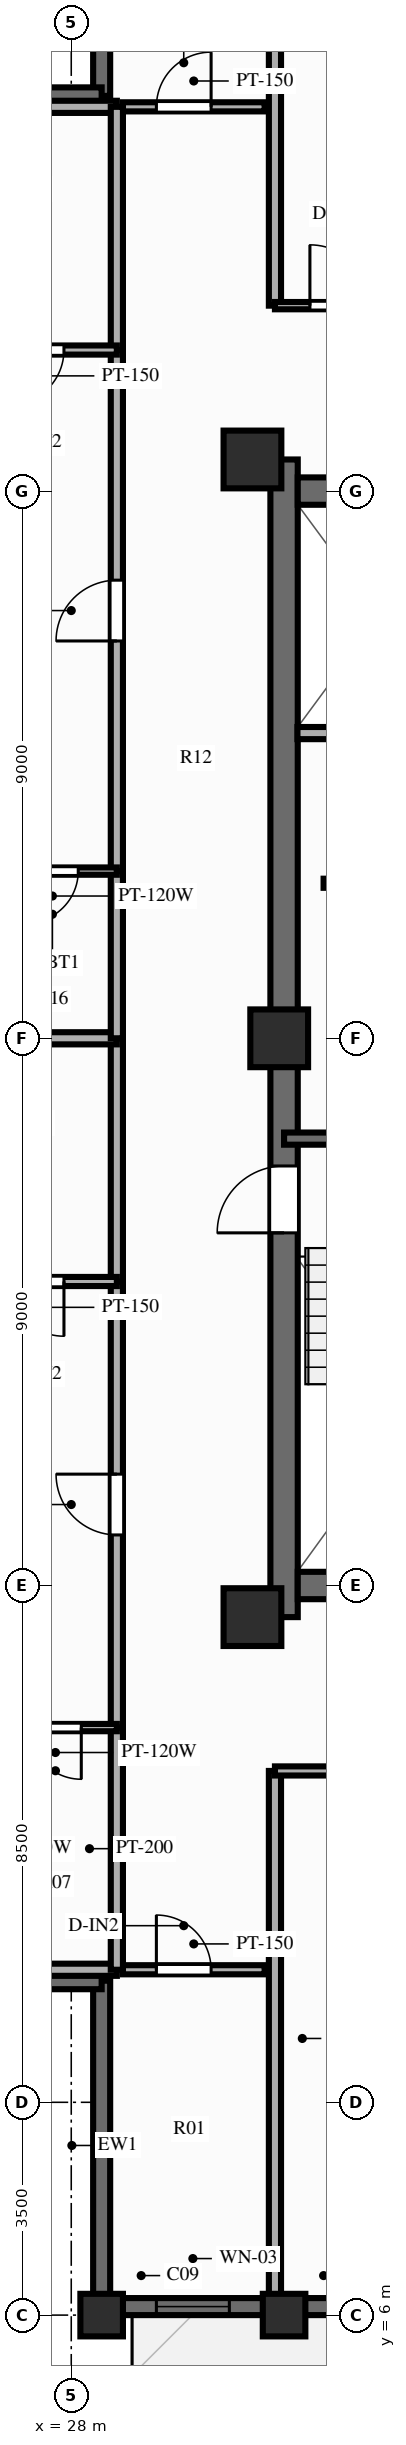
"""IFC4 building model, lengths in metres.
Left out: names, types, materials, properties, quantities, classifications, styles, units other than length and angle.
Written with IfcOpenShell. Run it as: python <this file> out.ifc"""

import sys

from ifc_helpers import new_model, si_unit, direction, frame, frame_2d, origin, origin_2d, place, context, subcontext, project, spatial, rectangle, extrude, source, transform, mapped, element, fill, save


model = new_model("IFC4")
c1 = context("Model", 3, precision=1e-05, world=origin(), true_north=direction((0.0, 1.0)))
c2 = subcontext(c1, "Body", "Model", "MODEL_VIEW")
j1 = project(units=[si_unit("LENGTHUNIT", "METRE"), si_unit("PLANEANGLEUNIT", "RADIAN")], contexts=[c1])
p1 = place(None, origin())
s1 = spatial("IfcSite", under=j1, at=p1, CompositionType="ELEMENT")
p2 = place(p1, origin())
s2 = spatial("IfcBuilding", under=s1, at=p2, CompositionType="ELEMENT")
p3 = place(p2, frame((0.0, 0.0, 243.0)))
s3 = spatial("IfcBuildingStorey", under=s2, at=p3, CompositionType="ELEMENT", Elevation=243.0)
p4 = place(p3, frame((31.5, 17.48, 0.0), z_axis=(0.0, 0.0, 1.0), x_axis=(0.0, 1.0, 0.0)))
e1 = element("IfcWall", 1, at=p4, inside=s3, PredefinedType="SHEAR", context=c2, shape_type="SweptSolid", body=[
    extrude(rectangle(XDim=19.04, YDim=0.45, at=frame_2d((9.52, 0.0))), origin(), (0.0, 0.0, 1.0), 3.0),
])
p5 = place(p4, frame((6.32, 0.0, 0.0)))
e2 = element("IfcOpeningElement", 2, at=p5, cuts=e1, PredefinedType="OPENING", context=c2, shape_type="SweptSolid", body=[
    extrude(rectangle(XDim=1.1, YDim=2.15, at=frame_2d((0.55, 1.075))), frame((0.0, 0.237, 0.0), z_axis=(0.0, -1.0, 0.0), x_axis=(1.0, 0.0, 0.0)), (0.0, 0.0, 1.0), 0.474),
])
p6 = place(p3, frame((31.725, 18.0, 0.0), z_axis=(0.0, 0.0, 1.0), x_axis=(1.0, 0.0, 0.0)))
e3 = element("IfcWall", 3, at=p6, inside=s3, PredefinedType="SHEAR", context=c2, shape_type="SweptSolid", body=[
    extrude(rectangle(XDim=12.55, YDim=0.45, at=frame_2d((6.275, 0.0))), origin(), (0.0, 0.0, 1.0), 3.0),
])
p7 = place(p3, frame((31.725, 36.0, 0.0), z_axis=(0.0, 0.0, 1.0), x_axis=(1.0, 0.0, 0.0)))
e4 = element("IfcWall", 4, at=p7, inside=s3, PredefinedType="SHEAR", context=c2, shape_type="SweptSolid", body=[
    extrude(rectangle(XDim=12.55, YDim=0.45, at=frame_2d((6.275, 0.0))), origin(), (0.0, 0.0, 1.0), 3.0),
])
p8 = place(p7, frame((5.225, 0.0, 0.0), z_axis=(0.0, 0.0, 1.0), x_axis=(-1.0, 0.0, 0.0)))
e5 = element("IfcOpeningElement", 5, at=p8, cuts=e4, PredefinedType="OPENING", context=c2, shape_type="SweptSolid", body=[
    extrude(rectangle(XDim=1.4, YDim=2.15, at=frame_2d((0.7, 1.075))), frame((0.0, 0.237, 0.0), z_axis=(0.0, -1.0, 0.0), x_axis=(1.0, 0.0, 0.0)), (0.0, 0.0, 1.0), 0.474),
])
m1 = source(origin(), c2, "Body", "SweptSolid", [
    extrude(rectangle(XDim=0.95, YDim=0.95, at=origin_2d()), origin(), (0.0, 0.0, 1.0), 3.0),
])
for number, where, z_axis, x_axis in (
    (6, (30.98, 17.48, 0.0), (0.0, 0.0, 1.0), (1.0, 0.0, 0.0)),
    (7, (30.98, 36.52, 0.0), (0.0, 0.0, 1.0), (1.0, 0.0, 0.0)),
    (8, (31.42, 27.0, 0.0), (0.0, 0.0, 1.0), (1.0, 0.0, 0.0)),
):
    element("IfcColumn", number, at=place(p3, frame(where, z_axis=z_axis, x_axis=x_axis)), inside=s3, PredefinedType="COLUMN", context=c2, shape_type="MappedRepresentation", body=[
        mapped(m1, transform((0.0, 0.0, 0.0), scale=1.0)),
    ])
m2 = source(origin(), c2, "Body", "SweptSolid", [
    extrude(rectangle(XDim=0.7, YDim=0.7, at=origin_2d()), origin(), (0.0, 0.0, 1.0), 3.0),
])
for number, where, z_axis, x_axis in (
    (9, (28.5, 6.0, 0.0), (0.0, 0.0, 1.0), (1.0, 0.0, 0.0)),
    (10, (31.5, 6.0, 0.0), (0.0, 0.0, 1.0), (1.0, 0.0, 0.0)),
):
    element("IfcColumn", number, at=place(p3, frame(where, z_axis=z_axis, x_axis=x_axis)), inside=s3, PredefinedType="COLUMN", context=c2, shape_type="MappedRepresentation", body=[
        mapped(m2, transform((0.0, 0.0, 0.0), scale=1.0)),
    ])
p9 = place(p3, frame((28.5, 6.14, 0.0), z_axis=(0.0, 0.0, 1.0), x_axis=(1.0, 0.0, 0.0)))
e11 = element("IfcWall", 11, at=p9, inside=s3, PredefinedType="SOLIDWALL", context=c2, shape_type="SweptSolid", body=[
    extrude(rectangle(XDim=19.0, YDim=0.28, at=frame_2d((9.5, 0.0))), origin(), (0.0, 0.0, 1.0), 2.28),
])
p10 = place(p9, frame((0.9, 0.0, 0.25)))
e12 = element("IfcOpeningElement", 12, at=p10, cuts=e11, PredefinedType="OPENING", context=c2, shape_type="SweptSolid", body=[
    extrude(rectangle(XDim=1.2, YDim=1.5, at=frame_2d((0.6, 0.75))), frame((0.0, 0.152, 0.0), z_axis=(0.0, -1.0, 0.0), x_axis=(1.0, 0.0, 0.0)), (0.0, 0.0, 1.0), 0.304),
])
p11 = place(p9, frame((6.895, 0.0, 0.0), z_axis=(0.0, 0.0, 1.0), x_axis=(-1.0, 0.0, 0.0)))
e13 = element("IfcOpeningElement", 13, at=p11, cuts=e11, PredefinedType="OPENING", context=c2, shape_type="SweptSolid", body=[
    extrude(rectangle(XDim=1.1, YDim=2.15, at=frame_2d((0.55, 1.075))), frame((0.0, 0.152, 0.0), z_axis=(0.0, -1.0, 0.0), x_axis=(1.0, 0.0, 0.0)), (0.0, 0.0, 1.0), 0.304),
])
p12 = place(p9, frame((10.8, 0.0, 0.25)))
e14 = element("IfcOpeningElement", 14, at=p12, cuts=e11, PredefinedType="OPENING", context=c2, shape_type="SweptSolid", body=[
    extrude(rectangle(XDim=1.2, YDim=1.5, at=frame_2d((0.6, 0.75))), frame((0.0, 0.152, 0.0), z_axis=(0.0, -1.0, 0.0), x_axis=(1.0, 0.0, 0.0)), (0.0, 0.0, 1.0), 0.304),
])
p13 = place(p9, frame((13.955, 0.0, 0.25)))
e15 = element("IfcOpeningElement", 15, at=p13, cuts=e11, PredefinedType="OPENING", context=c2, shape_type="SweptSolid", body=[
    extrude(rectangle(XDim=1.2, YDim=1.5, at=frame_2d((0.6, 0.75))), frame((0.0, 0.152, 0.0), z_axis=(0.0, -1.0, 0.0), x_axis=(1.0, 0.0, 0.0)), (0.0, 0.0, 1.0), 0.304),
])
p14 = place(p9, frame((16.9, 0.0, 0.25)))
e16 = element("IfcOpeningElement", 16, at=p14, cuts=e11, PredefinedType="OPENING", context=c2, shape_type="SweptSolid", body=[
    extrude(rectangle(XDim=1.2, YDim=1.5, at=frame_2d((0.6, 0.75))), frame((0.0, 0.152, 0.0), z_axis=(0.0, -1.0, 0.0), x_axis=(1.0, 0.0, 0.0)), (0.0, 0.0, 1.0), 0.304),
])
for number, where, z_axis, x_axis in (
    (17, (28.5, 6.08, 0.0), (0.0, 0.0, 1.0), (0.0, 1.0, 0.0)),
    (18, (23.08, 11.5, 0.0), (0.0, 0.0, 1.0), (1.0, 0.0, 0.0)),
    (19, (28.5, 42.5, 0.0), (0.0, 0.0, 1.0), (0.0, 1.0, 0.0)),
    (20, (23.08, 42.5, 0.0), (0.0, 0.0, 1.0), (1.0, 0.0, 0.0)),
):
    element("IfcWall", number, at=place(p3, frame(where, z_axis=z_axis, x_axis=x_axis)), inside=s3, PredefinedType="SOLIDWALL", context=c2, shape_type="SweptSolid", body=[
        extrude(rectangle(XDim=5.42, YDim=0.28, at=frame_2d((2.71, 0.0))), origin(), (0.0, 0.0, 1.0), 2.28),
    ])
p15 = place(p3, frame((32.15, 29.55, 0.0), z_axis=(0.0, 0.0, 1.0), x_axis=(1.0, 0.0, 0.0)))
e21 = element("IfcWall", 21, at=p15, inside=s3, PredefinedType="PARTITIONING", context=c2, shape_type="SweptSolid", body=[
    extrude(rectangle(XDim=2.27, YDim=0.15, at=frame_2d((1.135, 0.0))), origin(), (0.0, 0.0, 1.0), 2.79),
])
p16 = place(p3, frame((31.5, 25.35, 0.0), z_axis=(0.0, 0.0, 1.0), x_axis=(1.0, 0.0, 0.0)))
e22 = element("IfcWall", 22, at=p16, inside=s3, PredefinedType="SOLIDWALL", context=c2, shape_type="SweptSolid", body=[
    extrude(rectangle(XDim=3.93, YDim=0.2, at=frame_2d((1.965, 0.0))), origin(), (0.0, 0.0, 1.0), 2.79),
])
p17 = place(p3, frame((31.72, 32.02, 0.0), z_axis=(0.0, 0.0, 1.0), x_axis=(1.0, 0.0, 0.0)))
e23 = element("IfcWall", 23, at=p17, inside=s3, PredefinedType="PARTITIONING", context=c2, shape_type="SweptSolid", body=[
    extrude(rectangle(XDim=2.8, YDim=0.2, at=frame_2d((1.4, 0.0))), origin(), (0.0, 0.0, 1.0), 2.79),
])
p18 = place(p3, frame((28.85, 11.68, 0.0), z_axis=(0.0, 0.0, 1.0), x_axis=(1.0, 0.0, 0.0)))
e24 = element("IfcWall", 24, at=p18, inside=s3, PredefinedType="PARTITIONING", context=c2, shape_type="SweptSolid", body=[
    extrude(rectangle(XDim=2.33, YDim=0.15, at=frame_2d((1.165, 0.0))), origin(), (0.0, 0.0, 1.0), 2.79),
])
p19 = place(p18, frame((0.55, 0.0, 0.0)))
e25 = element("IfcOpeningElement", 25, at=p19, cuts=e24, PredefinedType="OPENING", context=c2, shape_type="SweptSolid", body=[
    extrude(rectangle(XDim=0.9, YDim=2.1, at=frame_2d((0.45, 1.05))), frame((0.0, 0.087, 0.0), z_axis=(0.0, -1.0, 0.0), x_axis=(1.0, 0.0, 0.0)), (0.0, 0.0, 1.0), 0.174),
])
p20 = place(p3, frame((28.85, 42.32, 0.0), z_axis=(0.0, 0.0, 1.0), x_axis=(1.0, 0.0, 0.0)))
e26 = element("IfcWall", 26, at=p20, inside=s3, PredefinedType="PARTITIONING", context=c2, shape_type="SweptSolid", body=[
    extrude(rectangle(XDim=2.33, YDim=0.15, at=frame_2d((1.165, 0.0))), origin(), (0.0, 0.0, 1.0), 2.79),
])
p21 = place(p20, frame((0.55, 0.0, 0.0)))
e27 = element("IfcOpeningElement", 27, at=p21, cuts=e26, PredefinedType="OPENING", context=c2, shape_type="SweptSolid", body=[
    extrude(rectangle(XDim=0.9, YDim=2.1, at=frame_2d((0.45, 1.05))), frame((0.0, 0.087, 0.0), z_axis=(0.0, -1.0, 0.0), x_axis=(1.0, 0.0, 0.0)), (0.0, 0.0, 1.0), 0.174),
])
p22 = place(p3, frame((31.35, 14.95, 0.0), z_axis=(0.0, 0.0, 1.0), x_axis=(0.0, -1.0, 0.0)))
e28 = element("IfcWall", 28, at=p22, inside=s3, PredefinedType="PARTITIONING", context=c2, shape_type="SweptSolid", body=[
    extrude(rectangle(XDim=8.8, YDim=0.2, at=frame_2d((4.4, 0.0))), origin(), (0.0, 0.0, 1.0), 2.39),
])
p23 = place(p3, frame((31.35, 14.95, 0.0), z_axis=(0.0, 0.0, 1.0), x_axis=(1.0, 0.0, 0.0)))
e29 = element("IfcWall", 29, at=p23, inside=s3, PredefinedType="PARTITIONING", context=c2, shape_type="SweptSolid", body=[
    extrude(rectangle(XDim=6.65, YDim=0.15, at=frame_2d((3.325, 0.0))), origin(), (0.0, 0.0, 1.0), 2.79),
])
p24 = place(p23, frame((2.775, 0.0, 0.0)))
e30 = element("IfcOpeningElement", 30, at=p24, cuts=e29, PredefinedType="OPENING", context=c2, shape_type="SweptSolid", body=[
    extrude(rectangle(XDim=1.1, YDim=2.15, at=frame_2d((0.55, 1.075))), frame((0.0, 0.087, 0.0), z_axis=(0.0, -1.0, 0.0), x_axis=(1.0, 0.0, 0.0)), (0.0, 0.0, 1.0), 0.174),
])
p25 = place(p3, frame((31.35, 39.05, 0.0), z_axis=(0.0, 0.0, 1.0), x_axis=(0.0, 1.0, 0.0)))
e31 = element("IfcWall", 31, at=p25, inside=s3, PredefinedType="PARTITIONING", context=c2, shape_type="SweptSolid", body=[
    extrude(rectangle(XDim=8.8, YDim=0.2, at=frame_2d((4.4, 0.0))), origin(), (0.0, 0.0, 1.0), 2.39),
])
p26 = place(p3, frame((31.35, 39.05, 0.0), z_axis=(0.0, 0.0, 1.0), x_axis=(1.0, 0.0, 0.0)))
e32 = element("IfcWall", 32, at=p26, inside=s3, PredefinedType="PARTITIONING", context=c2, shape_type="SweptSolid", body=[
    extrude(rectangle(XDim=2.15, YDim=0.12, at=frame_2d((1.075, 0.0))), origin(), (0.0, 0.0, 1.0), 2.79),
])
p27 = place(p26, frame((0.575, 0.0, 0.0)))
e33 = element("IfcOpeningElement", 33, at=p27, cuts=e32, PredefinedType="OPENING", context=c2, shape_type="SweptSolid", body=[
    extrude(rectangle(XDim=1.0, YDim=2.1, at=frame_2d((0.5, 1.05))), frame((0.0, 0.072, 0.0), z_axis=(0.0, -1.0, 0.0), x_axis=(1.0, 0.0, 0.0)), (0.0, 0.0, 1.0), 0.144),
])
for number, where, z_axis, x_axis in (
    (34, (28.75, 11.68, 0.0), (0.0, 0.0, 1.0), (-1.0, 0.0, 0.0)),
    (35, (28.75, 42.32, 0.0), (0.0, 0.0, 1.0), (-1.0, 0.0, 0.0)),
):
    element("IfcWall", number, at=place(p3, frame(where, z_axis=z_axis, x_axis=x_axis)), inside=s3, PredefinedType="PARTITIONING", context=c2, shape_type="SweptSolid", body=[
        extrude(rectangle(XDim=5.6, YDim=0.2, at=frame_2d((2.8, 0.0))), origin(), (0.0, 0.0, 1.0), 2.79),
    ])
p28 = place(p3, frame((28.75, 11.68, 0.0), z_axis=(0.0, 0.0, 1.0), x_axis=(0.0, 1.0, 0.0)))
e36 = element("IfcWall", 36, at=p28, inside=s3, PredefinedType="PARTITIONING", context=c2, shape_type="SweptSolid", body=[
    extrude(rectangle(XDim=3.983, YDim=0.2, at=frame_2d((1.992, 0.0))), origin(), (0.0, 0.0, 1.0), 2.79),
])
p29 = place(p3, frame((28.75, 15.663, 0.0), z_axis=(0.0, 0.0, 1.0), x_axis=(0.0, 1.0, 0.0)))
e37 = element("IfcWall", 37, at=p29, inside=s3, PredefinedType="PARTITIONING", context=c2, shape_type="SweptSolid", body=[
    extrude(rectangle(XDim=7.337, YDim=0.2, at=frame_2d((3.668, 0.0))), origin(), (0.0, 0.0, 1.0), 2.79),
])
p30 = place(p29, frame((3.168, 0.0, 0.0)))
e38 = element("IfcOpeningElement", 38, at=p30, cuts=e37, PredefinedType="OPENING", context=c2, shape_type="SweptSolid", body=[
    extrude(rectangle(XDim=1.0, YDim=2.15, at=frame_2d((0.5, 1.075))), frame((0.0, 0.112, 0.0), z_axis=(0.0, -1.0, 0.0), x_axis=(1.0, 0.0, 0.0)), (0.0, 0.0, 1.0), 0.224),
])
p31 = place(p3, frame((28.75, 23.0, 0.0), z_axis=(0.0, 0.0, 1.0), x_axis=(0.0, 1.0, 0.0)))
e39 = element("IfcWall", 39, at=p31, inside=s3, PredefinedType="PARTITIONING", context=c2, shape_type="SweptSolid", body=[
    extrude(rectangle(XDim=4.0, YDim=0.2, at=frame_2d((2.0, 0.0))), origin(), (0.0, 0.0, 1.0), 2.79),
])
p32 = place(p3, frame((28.75, 15.663, 0.0), z_axis=(0.0, 0.0, 1.0), x_axis=(-1.0, 0.0, 0.0)))
e40 = element("IfcWall", 40, at=p32, inside=s3, PredefinedType="PARTITIONING", context=c2, shape_type="SweptSolid", body=[
    extrude(rectangle(XDim=2.02, YDim=0.12, at=frame_2d((1.01, 0.0))), origin(), (0.0, 0.0, 1.0), 2.79),
])
p33 = place(p32, frame((0.585, 0.0, 0.0)))
e41 = element("IfcOpeningElement", 41, at=p33, cuts=e40, PredefinedType="OPENING", context=c2, shape_type="SweptSolid", body=[
    extrude(rectangle(XDim=0.85, YDim=2.05, at=frame_2d((0.425, 1.025))), frame((0.0, 0.072, 0.0), z_axis=(0.0, -1.0, 0.0), x_axis=(1.0, 0.0, 0.0)), (0.0, 0.0, 1.0), 0.144),
])
p34 = place(p3, frame((28.75, 23.0, 0.0), z_axis=(0.0, 0.0, 1.0), x_axis=(-1.0, 0.0, 0.0)))
e42 = element("IfcWall", 42, at=p34, inside=s3, PredefinedType="PARTITIONING", context=c2, shape_type="SweptSolid", body=[
    extrude(rectangle(XDim=2.64, YDim=0.15, at=frame_2d((1.32, 0.0))), origin(), (0.0, 0.0, 1.0), 2.79),
])
p35 = place(p34, frame((0.87, 0.0, 0.0)))
e43 = element("IfcOpeningElement", 43, at=p35, cuts=e42, PredefinedType="OPENING", context=c2, shape_type="SweptSolid", body=[
    extrude(rectangle(XDim=0.9, YDim=2.1, at=frame_2d((0.45, 1.05))), frame((0.0, 0.087, 0.0), z_axis=(0.0, -1.0, 0.0), x_axis=(1.0, 0.0, 0.0)), (0.0, 0.0, 1.0), 0.174),
])
p36 = place(p3, frame((28.75, 27.0, 0.0), z_axis=(0.0, 0.0, 1.0), x_axis=(-1.0, 0.0, 0.0)))
e44 = element("IfcWall", 44, at=p36, inside=s3, PredefinedType="PARTITIONING", context=c2, shape_type="SweptSolid", body=[
    extrude(rectangle(XDim=5.6, YDim=0.2, at=frame_2d((2.8, 0.0))), origin(), (0.0, 0.0, 1.0), 2.79),
])
p37 = place(p3, frame((28.75, 27.0, 0.0), z_axis=(0.0, 0.0, 1.0), x_axis=(0.0, 1.0, 0.0)))
e45 = element("IfcWall", 45, at=p37, inside=s3, PredefinedType="PARTITIONING", context=c2, shape_type="SweptSolid", body=[
    extrude(rectangle(XDim=2.75, YDim=0.2, at=frame_2d((1.375, 0.0))), origin(), (0.0, 0.0, 1.0), 2.79),
])
p38 = place(p3, frame((28.75, 29.75, 0.0), z_axis=(0.0, 0.0, 1.0), x_axis=(0.0, 1.0, 0.0)))
e46 = element("IfcWall", 46, at=p38, inside=s3, PredefinedType="PARTITIONING", context=c2, shape_type="SweptSolid", body=[
    extrude(rectangle(XDim=8.57, YDim=0.2, at=frame_2d((4.285, 0.0))), origin(), (0.0, 0.0, 1.0), 2.79),
])
p39 = place(p38, frame((3.785, 0.0, 0.0)))
e47 = element("IfcOpeningElement", 47, at=p39, cuts=e46, PredefinedType="OPENING", context=c2, shape_type="SweptSolid", body=[
    extrude(rectangle(XDim=1.0, YDim=2.15, at=frame_2d((0.5, 1.075))), frame((0.0, 0.112, 0.0), z_axis=(0.0, -1.0, 0.0), x_axis=(1.0, 0.0, 0.0)), (0.0, 0.0, 1.0), 0.224),
])
p40 = place(p3, frame((28.75, 38.32, 0.0), z_axis=(0.0, 0.0, 1.0), x_axis=(0.0, 1.0, 0.0)))
e48 = element("IfcWall", 48, at=p40, inside=s3, PredefinedType="PARTITIONING", context=c2, shape_type="SweptSolid", body=[
    extrude(rectangle(XDim=4.0, YDim=0.2, at=frame_2d((2.0, 0.0))), origin(), (0.0, 0.0, 1.0), 2.79),
])
p41 = place(p3, frame((28.75, 29.75, 0.0), z_axis=(0.0, 0.0, 1.0), x_axis=(-1.0, 0.0, 0.0)))
e49 = element("IfcWall", 49, at=p41, inside=s3, PredefinedType="PARTITIONING", context=c2, shape_type="SweptSolid", body=[
    extrude(rectangle(XDim=2.12, YDim=0.12, at=frame_2d((1.06, 0.0))), origin(), (0.0, 0.0, 1.0), 2.79),
])
p42 = place(p41, frame((0.635, 0.0, 0.0)))
e50 = element("IfcOpeningElement", 50, at=p42, cuts=e49, PredefinedType="OPENING", context=c2, shape_type="SweptSolid", body=[
    extrude(rectangle(XDim=0.85, YDim=2.05, at=frame_2d((0.425, 1.025))), frame((0.0, 0.072, 0.0), z_axis=(0.0, -1.0, 0.0), x_axis=(1.0, 0.0, 0.0)), (0.0, 0.0, 1.0), 0.144),
])
p43 = place(p3, frame((28.75, 38.32, 0.0), z_axis=(0.0, 0.0, 1.0), x_axis=(-1.0, 0.0, 0.0)))
e51 = element("IfcWall", 51, at=p43, inside=s3, PredefinedType="PARTITIONING", context=c2, shape_type="SweptSolid", body=[
    extrude(rectangle(XDim=2.64, YDim=0.15, at=frame_2d((1.32, 0.0))), origin(), (0.0, 0.0, 1.0), 2.79),
])
p44 = place(p43, frame((0.87, 0.0, 0.0)))
e52 = element("IfcOpeningElement", 52, at=p44, cuts=e51, PredefinedType="OPENING", context=c2, shape_type="SweptSolid", body=[
    extrude(rectangle(XDim=0.9, YDim=2.1, at=frame_2d((0.45, 1.05))), frame((0.0, 0.087, 0.0), z_axis=(0.0, -1.0, 0.0), x_axis=(1.0, 0.0, 0.0)), (0.0, 0.0, 1.0), 0.174),
])
m3 = source(origin(), c2, "Body", "SweptSolid", [
    extrude(rectangle(XDim=1.2, YDim=1.5, at=frame_2d((0.6, 0.75))), frame((0.0, 0.03, 0.0), z_axis=(0.0, -1.0, 0.0), x_axis=(1.0, 0.0, 0.0)), (0.0, 0.0, 1.0), 0.06),
])
p45 = place(p10, origin())
e53 = element("IfcWindow", 53, at=p45, inside=s3, PartitioningType="SINGLE_PANEL", PredefinedType="WINDOW", context=c2, shape_type="MappedRepresentation", body=[
    mapped(m3, transform((0.0, 0.0, 0.0), scale=1.0)),
])
fill(e12, e53)
m4 = source(origin(), c2, "Body", "SweptSolid", [
    extrude(rectangle(XDim=1.1, YDim=2.15, at=frame_2d((0.55, 1.075))), frame((0.0, 0.025, 0.0), z_axis=(0.0, -1.0, 0.0), x_axis=(1.0, 0.0, 0.0)), (0.0, 0.0, 1.0), 0.05),
])
p46 = place(p5, origin())
e54 = element("IfcDoor", 54, at=p46, inside=s3, OperationType="SINGLE_SWING_LEFT", PredefinedType="DOOR", context=c2, shape_type="MappedRepresentation", body=[
    mapped(m4, transform((0.0, 0.0, 0.0), scale=1.0)),
])
fill(e2, e54)
m5 = source(origin(), c2, "Body", "SweptSolid", [
    extrude(rectangle(XDim=0.9, YDim=2.1, at=frame_2d((0.45, 1.05))), frame((0.0, 0.025, 0.0), z_axis=(0.0, -1.0, 0.0), x_axis=(1.0, 0.0, 0.0)), (0.0, 0.0, 1.0), 0.05),
])
p47 = place(p19, origin())
e55 = element("IfcDoor", 55, at=p47, inside=s3, OperationType="SINGLE_SWING_LEFT", PredefinedType="DOOR", context=c2, shape_type="MappedRepresentation", body=[
    mapped(m5, transform((0.0, 0.0, 0.0), scale=1.0)),
])
fill(e25, e55)
p48 = place(p21, origin())
e56 = element("IfcDoor", 56, at=p48, inside=s3, OperationType="SINGLE_SWING_RIGHT", PredefinedType="DOOR", context=c2, shape_type="MappedRepresentation", body=[
    mapped(m5, transform((0.0, 0.0, 0.0), scale=1.0)),
])
fill(e27, e56)
m6 = source(origin(), c2, "Body", "SweptSolid", [
    extrude(rectangle(XDim=1.0, YDim=2.1, at=frame_2d((0.5, 1.05))), frame((0.0, 0.025, 0.0), z_axis=(0.0, -1.0, 0.0), x_axis=(1.0, 0.0, 0.0)), (0.0, 0.0, 1.0), 0.05),
])
p49 = place(p27, origin())
e57 = element("IfcDoor", 57, at=p49, inside=s3, OperationType="SINGLE_SWING_LEFT", PredefinedType="DOOR", context=c2, shape_type="MappedRepresentation", body=[
    mapped(m6, transform((0.0, 0.0, 0.0), scale=1.0)),
])
fill(e33, e57)
m7 = source(origin(), c2, "Body", "SweptSolid", [
    extrude(rectangle(XDim=1.0, YDim=2.15, at=frame_2d((0.5, 1.075))), frame((0.0, 0.025, 0.0), z_axis=(0.0, -1.0, 0.0), x_axis=(1.0, 0.0, 0.0)), (0.0, 0.0, 1.0), 0.05),
])
p50 = place(p30, origin())
e58 = element("IfcDoor", 58, at=p50, inside=s3, OperationType="SINGLE_SWING_RIGHT", PredefinedType="DOOR", context=c2, shape_type="MappedRepresentation", body=[
    mapped(m7, transform((0.0, 0.0, 0.0), scale=1.0)),
])
fill(e38, e58)
m8 = source(origin(), c2, "Body", "SweptSolid", [
    extrude(rectangle(XDim=0.85, YDim=2.05, at=frame_2d((0.425, 1.025))), frame((0.0, 0.025, 0.0), z_axis=(0.0, -1.0, 0.0), x_axis=(1.0, 0.0, 0.0)), (0.0, 0.0, 1.0), 0.05),
])
p51 = place(p33, origin())
e59 = element("IfcDoor", 59, at=p51, inside=s3, OperationType="SINGLE_SWING_LEFT", PredefinedType="DOOR", context=c2, shape_type="MappedRepresentation", body=[
    mapped(m8, transform((0.0, 0.0, 0.0), scale=1.0)),
])
fill(e41, e59)
p52 = place(p35, origin())
e60 = element("IfcDoor", 60, at=p52, inside=s3, OperationType="SINGLE_SWING_LEFT", PredefinedType="DOOR", context=c2, shape_type="MappedRepresentation", body=[
    mapped(m5, transform((0.0, 0.0, 0.0), scale=1.0)),
])
fill(e43, e60)
p53 = place(p39, origin())
e61 = element("IfcDoor", 61, at=p53, inside=s3, OperationType="SINGLE_SWING_LEFT", PredefinedType="DOOR", context=c2, shape_type="MappedRepresentation", body=[
    mapped(m7, transform((0.0, 0.0, 0.0), scale=1.0)),
])
fill(e47, e61)
p54 = place(p42, origin())
e62 = element("IfcDoor", 62, at=p54, inside=s3, OperationType="SINGLE_SWING_RIGHT", PredefinedType="DOOR", context=c2, shape_type="MappedRepresentation", body=[
    mapped(m8, transform((0.0, 0.0, 0.0), scale=1.0)),
])
fill(e50, e62)
p55 = place(p44, origin())
e63 = element("IfcDoor", 63, at=p55, inside=s3, OperationType="SINGLE_SWING_RIGHT", PredefinedType="DOOR", context=c2, shape_type="MappedRepresentation", body=[
    mapped(m5, transform((0.0, 0.0, 0.0), scale=1.0)),
])
fill(e52, e63)
save(model, sys.argv[1])
